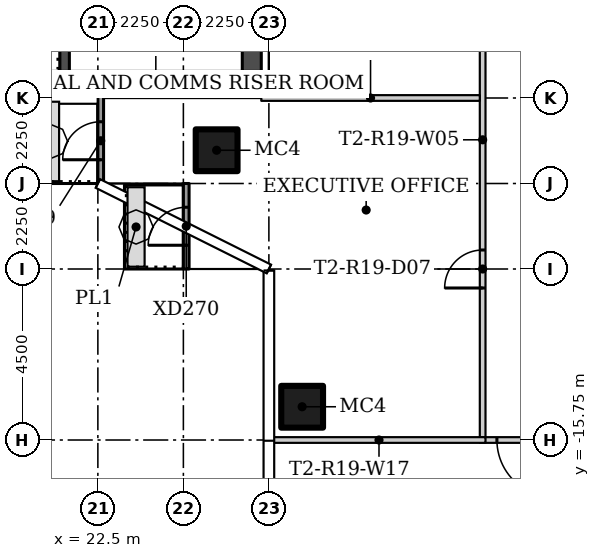
"""IFC4 building model, lengths in metres.
Left out: names, types, materials, properties, quantities, classifications, styles, units other than length and angle.
Written with IfcOpenShell. Run it as: python <this file> out.ifc"""

import sys

from ifc_helpers import new_model, si_unit, direction, frame, frame_2d, origin, origin_2d, place, context, subcontext, project, spatial, rectangle, hollow_rectangle, extrude, element, fill, save


model = new_model("IFC4")
c1 = context("Model", 3, precision=1e-05, world=origin(), true_north=direction((0.0, 1.0)))
c2 = subcontext(c1, "Body", "Model", "MODEL_VIEW")
j1 = project(units=[si_unit("LENGTHUNIT", "METRE"), si_unit("PLANEANGLEUNIT", "RADIAN")], contexts=[c1])
p1 = place(None, origin())
s1 = spatial("IfcSite", under=j1, at=p1, CompositionType="ELEMENT")
p2 = place(p1, origin())
s2 = spatial("IfcBuilding", under=s1, at=p2, CompositionType="ELEMENT")
p3 = place(p2, frame((0.0, 0.0, 174.0)))
s3 = spatial("IfcBuildingStorey", under=s2, at=p3, CompositionType="ELEMENT", Elevation=174.0)
for number, where in (
    (1, (25.625, -8.125, 0.0)),
    (2, (27.875, -14.875, 0.0)),
):
    element("IfcColumn", number, at=place(p3, frame(where)), inside=s3, PredefinedType="COLUMN", context=c2, shape_type="SweptSolid", body=[
        extrude(hollow_rectangle(XDim=1.1, YDim=1.1, WallThickness=0.04, at=origin_2d()), origin(), (0.0, 0.0, 1.0), 3.45),
    ])
p4 = place(p3, frame((32.625, -15.675, 0.0), z_axis=(0.0, 0.0, 1.0), x_axis=(0.0, 1.0, 0.0)))
e3 = element("IfcWall", 3, at=p4, inside=s3, PredefinedType="PARTITIONING", context=c2, shape_type="SweptSolid", body=[
    extrude(rectangle(XDim=15.65, YDim=0.15, at=frame_2d((7.825, 0.0))), origin(), (0.0, 0.0, 1.0), 3.45),
])
p5 = place(p4, frame((11.875, 0.0, 0.0)))
e4 = element("IfcOpeningElement", 4, at=p5, cuts=e3, PredefinedType="OPENING", context=c2, shape_type="SweptSolid", body=[
    extrude(rectangle(XDim=0.9, YDim=2.1, at=frame_2d((0.45, 1.05))), frame((0.0, 0.085, 0.0), z_axis=(0.0, -1.0, 0.0), x_axis=(1.0, 0.0, 0.0)), (0.0, 0.0, 1.0), 0.17),
])
p6 = place(p4, frame((3.925, 0.0, 0.0)))
e5 = element("IfcOpeningElement", 5, at=p6, cuts=e3, PredefinedType="OPENING", context=c2, shape_type="SweptSolid", body=[
    extrude(rectangle(XDim=1.0, YDim=2.4, at=frame_2d((0.5, 1.2))), frame((0.0, 0.085, 0.0), z_axis=(0.0, -1.0, 0.0), x_axis=(1.0, 0.0, 0.0)), (0.0, 0.0, 1.0), 0.17),
])
p7 = place(p3, frame((34.95, -15.75, 0.0), z_axis=(0.0, 0.0, 1.0), x_axis=(-1.0, 0.0, 0.0)))
e6 = element("IfcWall", 6, at=p7, inside=s3, PredefinedType="PARTITIONING", context=c2, shape_type="SweptSolid", body=[
    extrude(rectangle(XDim=2.4, YDim=0.15, at=frame_2d((1.2, 0.0))), origin(), (0.0, 0.0, 1.0), 3.45),
])
p8 = place(p7, frame((0.45, 0.0, 0.0)))
e7 = element("IfcOpeningElement", 7, at=p8, cuts=e6, PredefinedType="OPENING", context=c2, shape_type="SweptSolid", body=[
    extrude(rectangle(XDim=1.5, YDim=2.1, at=frame_2d((0.75, 1.05))), frame((0.0, 0.085, 0.0), z_axis=(0.0, -1.0, 0.0), x_axis=(1.0, 0.0, 0.0)), (0.0, 0.0, 1.0), 0.17),
])
p9 = place(p3, frame((26.8, -6.75, 0.0)))
e8 = element("IfcWall", 8, at=p9, inside=s3, PredefinedType="PARTITIONING", context=c2, shape_type="SweptSolid", body=[
    extrude(rectangle(XDim=5.75, YDim=0.15, at=frame_2d((2.875, 0.0))), origin(), (0.0, 0.0, 1.0), 3.45),
])
p10 = place(p3, frame((27.095, -15.75, 0.0)))
e9 = element("IfcWall", 9, at=p10, inside=s3, PredefinedType="PARTITIONING", context=c2, shape_type="SweptSolid", body=[
    extrude(rectangle(XDim=5.605, YDim=0.15, at=frame_2d((2.802, 0.0))), origin(), (0.0, 0.0, 1.0), 3.45),
])
p11 = place(p3, frame((22.575, -9.0, 0.0), z_axis=(0.0, 0.0, 1.0), x_axis=(0.0, 1.0, 0.0)))
e10 = element("IfcWall", 10, at=p11, inside=s3, PredefinedType="SOLIDWALL", context=c2, shape_type="SweptSolid", body=[
    extrude(rectangle(XDim=2.457, YDim=0.15, at=frame_2d((1.229, 0.0))), origin(), (0.0, 0.0, 1.0), 3.45),
])
p12 = place(p11, frame((0.625, 0.0, 0.0)))
e11 = element("IfcOpeningElement", 11, at=p12, cuts=e10, PredefinedType="OPENING", context=c2, shape_type="SweptSolid", body=[
    extrude(rectangle(XDim=1.0, YDim=2.4, at=frame_2d((0.5, 1.2))), frame((0.0, 0.085, 0.0), z_axis=(0.0, -1.0, 0.0), x_axis=(1.0, 0.0, 0.0)), (0.0, 0.0, 1.0), 0.17),
])
p13 = place(p3, frame((24.825, -11.25, 0.0), z_axis=(0.0, 0.0, 1.0), x_axis=(0.0, 1.0, 0.0)))
e12 = element("IfcWall", 12, at=p13, inside=s3, PredefinedType="SOLIDWALL", context=c2, shape_type="SweptSolid", body=[
    extrude(rectangle(XDim=2.25, YDim=0.15, at=frame_2d((1.125, 0.0))), origin(), (0.0, 0.0, 1.0), 3.45),
])
p14 = place(p13, frame((0.625, 0.0, 0.0)))
e13 = element("IfcOpeningElement", 13, at=p14, cuts=e12, PredefinedType="OPENING", context=c2, shape_type="SweptSolid", body=[
    extrude(rectangle(XDim=1.0, YDim=2.4, at=frame_2d((0.5, 1.2))), frame((0.0, 0.085, 0.0), z_axis=(0.0, -1.0, 0.0), x_axis=(1.0, 0.0, 0.0)), (0.0, 0.0, 1.0), 0.17),
])
p15 = place(p3, frame((13.7, -6.3, 0.0)))
e14 = element("IfcWall", 14, at=p15, inside=s3, PredefinedType="SHEAR", context=c2, shape_type="SweptSolid", body=[
    extrude(rectangle(XDim=13.1, YDim=0.5, at=frame_2d((6.55, 0.0))), origin(), (0.0, 0.0, 1.0), 3.45),
])
p16 = place(p3, frame((26.55, 6.05, 0.0), z_axis=(0.0, 0.0, 1.0), x_axis=(0.0, -1.0, 0.0)))
e15 = element("IfcWall", 15, at=p16, inside=s3, PredefinedType="SHEAR", context=c2, shape_type="SweptSolid", body=[
    extrude(rectangle(XDim=12.1, YDim=0.5, at=frame_2d((6.05, 0.0))), origin(), (0.0, 0.0, 1.0), 3.45),
])
p17 = place(p16, frame((10.1, 0.0, 0.0)))
e16 = element("IfcOpeningElement", 16, at=p17, cuts=e15, PredefinedType="OPENING", context=c2, shape_type="SweptSolid", body=[
    extrude(rectangle(XDim=1.2, YDim=2.1, at=frame_2d((0.6, 1.05))), frame((0.0, 0.26, 0.0), z_axis=(0.0, -1.0, 0.0), x_axis=(1.0, 0.0, 0.0)), (0.0, 0.0, 1.0), 0.52),
])
p18 = place(p16, frame((3.9, 0.0, 0.0)))
e17 = element("IfcOpeningElement", 17, at=p18, cuts=e15, PredefinedType="OPENING", context=c2, shape_type="SweptSolid", body=[
    extrude(rectangle(XDim=1.8, YDim=2.4, at=frame_2d((0.9, 1.2))), frame((0.0, 0.26, 0.0), z_axis=(0.0, -1.0, 0.0), x_axis=(1.0, 0.0, 0.0)), (0.0, 0.0, 1.0), 0.52),
])
p19 = place(p3, frame((21.625, -6.05, 0.0), z_axis=(0.0, 0.0, 1.0), x_axis=(0.0, 1.0, 0.0)))
e18 = element("IfcWall", 18, at=p19, inside=s3, PredefinedType="SHEAR", context=c2, shape_type="SweptSolid", body=[
    extrude(rectangle(XDim=2.55, YDim=0.25, at=frame_2d((1.275, 0.0))), origin(), (0.0, 0.0, 1.0), 3.45),
])
p20 = place(p8, origin())
e19 = element("IfcDoor", 19, at=p20, inside=s3, OperationType="DOUBLE_DOOR_SINGLE_SWING", PredefinedType="DOOR", context=c2, shape_type="SweptSolid", body=[
    extrude(rectangle(XDim=1.5, YDim=2.1, at=frame_2d((0.75, 1.05))), frame((0.0, 0.025, 0.0), z_axis=(0.0, -1.0, 0.0), x_axis=(1.0, 0.0, 0.0)), (0.0, 0.0, 1.0), 0.05),
])
fill(e7, e19)
p21 = place(p6, origin())
e20 = element("IfcDoor", 20, at=p21, inside=s3, OperationType="SINGLE_SWING_LEFT", PredefinedType="DOOR", context=c2, shape_type="SweptSolid", body=[
    extrude(rectangle(XDim=1.0, YDim=2.4, at=frame_2d((0.5, 1.2))), frame((0.0, 0.025, 0.0), z_axis=(0.0, -1.0, 0.0), x_axis=(1.0, 0.0, 0.0)), (0.0, 0.0, 1.0), 0.05),
])
fill(e5, e20)
p22 = place(p12, origin())
e21 = element("IfcDoor", 21, at=p22, inside=s3, OperationType="SINGLE_SWING_LEFT", PredefinedType="DOOR", context=c2, shape_type="SweptSolid", body=[
    extrude(rectangle(XDim=1.0, YDim=2.4, at=frame_2d((0.5, 1.2))), frame((0.0, 0.025, 0.0), z_axis=(0.0, -1.0, 0.0), x_axis=(1.0, 0.0, 0.0)), (0.0, 0.0, 1.0), 0.05),
])
fill(e11, e21)
p23 = place(p14, origin())
e22 = element("IfcDoor", 22, at=p23, inside=s3, OperationType="SINGLE_SWING_RIGHT", PredefinedType="DOOR", context=c2, shape_type="SweptSolid", body=[
    extrude(rectangle(XDim=1.0, YDim=2.4, at=frame_2d((0.5, 1.2))), frame((0.0, 0.025, 0.0), z_axis=(0.0, -1.0, 0.0), x_axis=(1.0, 0.0, 0.0)), (0.0, 0.0, 1.0), 0.05),
])
fill(e13, e22)
save(model, sys.argv[1])
